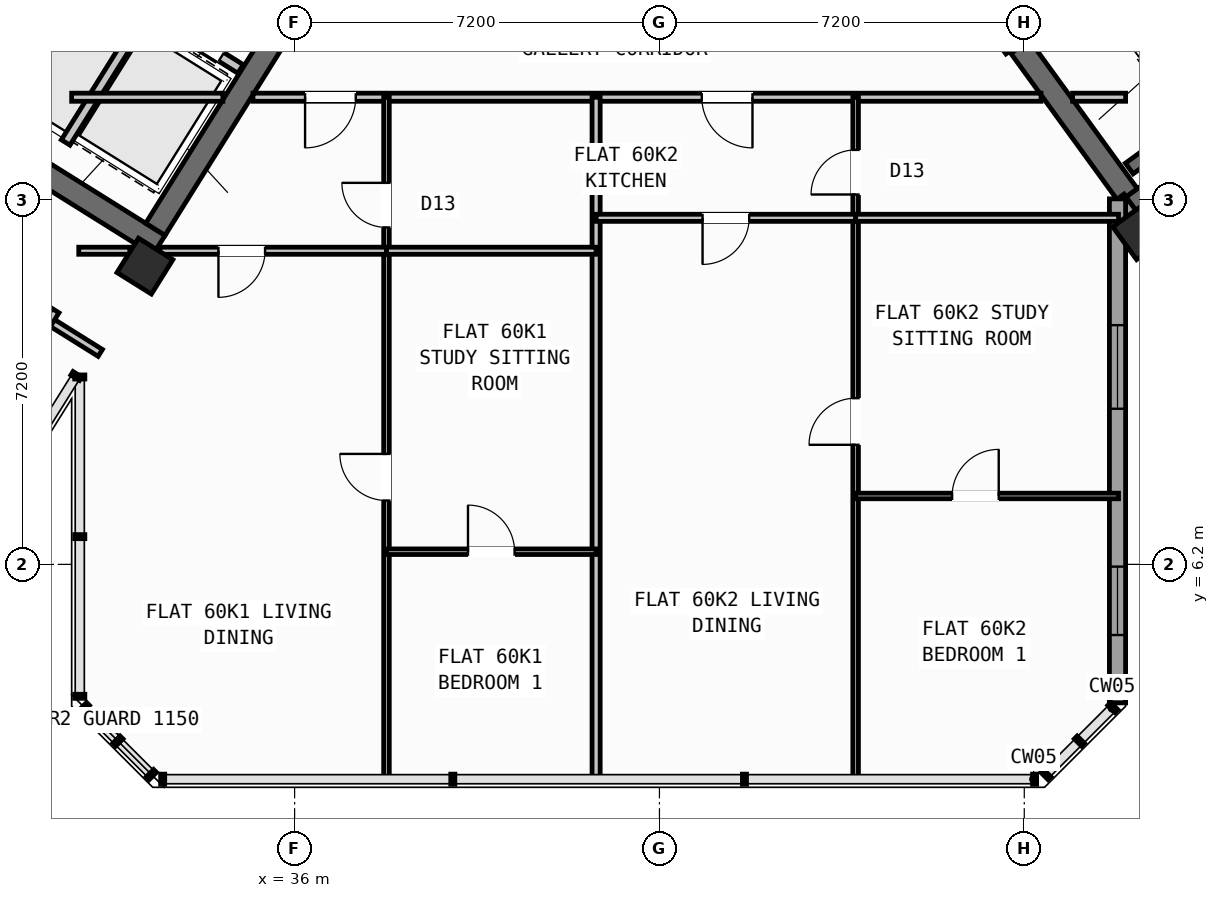
"""IFC4 building model, lengths in metres.
Left out: names, types, materials, properties, quantities, classifications, styles, units other than length and angle.
Written with IfcOpenShell. Run it as: python <this file> out.ifc"""

import sys

from ifc_helpers import new_model, si_unit, direction, frame, frame_2d, origin, origin_2d, place, context, subcontext, project, spatial, rectangle, hollow_rectangle, extrude, source, transform, mapped, element, fill, save


model = new_model("IFC4")
c1 = context("Model", 3, precision=1e-05, world=origin(), true_north=direction((0.0, 1.0)))
c2 = subcontext(c1, "Body", "Model", "MODEL_VIEW")
j1 = project(units=[si_unit("LENGTHUNIT", "METRE"), si_unit("PLANEANGLEUNIT", "RADIAN")], contexts=[c1])
p1 = place(None, origin())
s1 = spatial("IfcSite", under=j1, at=p1, CompositionType="ELEMENT")
p2 = place(p1, origin())
s2 = spatial("IfcBuilding", under=s1, at=p2, CompositionType="ELEMENT")
p3 = place(p2, frame((0.0, 0.0, 238.5)))
s3 = spatial("IfcBuildingStorey", under=s2, at=p3, CompositionType="ELEMENT", Elevation=238.5)
p4 = place(p3, frame((33.324, 12.503, 0.0), z_axis=(0.0, 0.0, 1.0), x_axis=(-0.848043529849, 0.529926571782, 0.0)))
e1 = element("IfcWall", 1, at=p4, inside=s3, PredefinedType="SHEAR", context=c2, shape_type="SweptSolid", body=[
    extrude(rectangle(XDim=13.04, YDim=0.45, at=frame_2d((6.52, 0.0))), origin(), (0.0, 0.0, 1.0), 3.35),
])
p5 = place(p3, frame((36.683, 18.304, 0.0), z_axis=(0.0, 0.0, 1.0), x_axis=(-0.529904039071, -0.848057609704, 0.0)))
e2 = element("IfcWall", 2, at=p5, inside=s3, PredefinedType="SHEAR", context=c2, shape_type="SweptSolid", body=[
    extrude(rectangle(XDim=6.475, YDim=0.45, at=frame_2d((3.238, 0.0))), origin(), (0.0, 0.0, 1.0), 3.35),
])
p6 = place(p3, frame((52.399, 13.169, 0.0), z_axis=(0.0, 0.0, 1.0), x_axis=(0.809022352778, 0.587777877013, 0.0)))
e3 = element("IfcWall", 3, at=p6, inside=s3, PredefinedType="SHEAR", context=c2, shape_type="SweptSolid", body=[
    extrude(rectangle(XDim=12.24, YDim=0.45, at=frame_2d((6.12, 0.0))), origin(), (0.0, 0.0, 1.0), 3.35),
])
p7 = place(p3, frame((52.449, 13.483, 0.0), z_axis=(0.0, 0.0, 1.0), x_axis=(-0.587819244441, 0.808992296542, 0.0)))
e4 = element("IfcWall", 4, at=p7, inside=s3, PredefinedType="SHEAR", context=c2, shape_type="SweptSolid", body=[
    extrude(rectangle(XDim=3.625, YDim=0.45, at=frame_2d((1.812, 0.0))), origin(), (0.0, 0.0, 1.0), 3.35),
])
m1 = source(origin(), c2, "Body", "SweptSolid", [
    extrude(hollow_rectangle(XDim=0.8, YDim=0.8, WallThickness=0.032, at=origin_2d()), origin(), (0.0, 0.0, 1.0), 3.6),
])
for number, where, z_axis, x_axis in (
    (5, (33.046, 12.087, 0.0), (0.0, 0.0, 1.0), (-0.848, 0.53, 0.0)),
    (6, (52.705, 12.773, 0.0), (0.0, 0.0, 1.0), (0.809, 0.588, 0.0)),
):
    element("IfcColumn", number, at=place(p3, frame(where, z_axis=z_axis, x_axis=x_axis)), inside=s3, PredefinedType="COLUMN", context=c2, shape_type="MappedRepresentation", body=[
        mapped(m1, transform((0.0, 0.0, 0.0), scale=1.0)),
    ])
p8 = place(p3, frame((56.581, 7.439, 0.0), z_axis=(0.0, 0.0, 1.0), x_axis=(-0.587776558368, 0.809023310809, 0.0)))
e7 = element("IfcWall", 7, at=p8, inside=s3, PredefinedType="STANDARD", context=c2, shape_type="SweptSolid", body=[
    extrude(rectangle(XDim=7.385, YDim=0.32, at=frame_2d((3.693, 0.0))), origin(), (0.0, 0.0, 1.0), 2.875),
])
p9 = place(p8, frame((1.731, 0.0, 0.9)))
e8 = element("IfcOpeningElement", 8, at=p9, cuts=e7, PredefinedType="OPENING", context=c2, shape_type="SweptSolid", body=[
    extrude(rectangle(XDim=1.65, YDim=1.45, at=frame_2d((0.825, 0.725))), frame((0.0, 0.17, 0.0), z_axis=(0.0, -1.0, 0.0), x_axis=(1.0, 0.0, 0.0)), (0.0, 0.0, 1.0), 0.34),
])
p10 = place(p3, frame((52.24, 13.414, 0.0), z_axis=(0.0, 0.0, 1.0), x_axis=(0.0, -1.0, 0.0)))
e9 = element("IfcWall", 9, at=p10, inside=s3, PredefinedType="STANDARD", context=c2, shape_type="SweptSolid", body=[
    extrude(rectangle(XDim=9.948, YDim=0.32, at=frame_2d((4.974, 0.0))), origin(), (0.0, 0.0, 1.0), 3.35),
])
p11 = place(p10, frame((2.492, 0.0, 0.9)))
e10 = element("IfcOpeningElement", 10, at=p11, cuts=e9, PredefinedType="OPENING", context=c2, shape_type="SweptSolid", body=[
    extrude(rectangle(XDim=1.65, YDim=1.45, at=frame_2d((0.825, 0.725))), frame((0.0, 0.17, 0.0), z_axis=(0.0, -1.0, 0.0), x_axis=(1.0, 0.0, 0.0)), (0.0, 0.0, 1.0), 0.34),
])
p12 = place(p10, frame((7.258, 0.0, 0.9)))
e11 = element("IfcOpeningElement", 11, at=p12, cuts=e9, PredefinedType="OPENING", context=c2, shape_type="SweptSolid", body=[
    extrude(rectangle(XDim=1.35, YDim=1.45, at=frame_2d((0.675, 0.725))), frame((0.0, 0.17, 0.0), z_axis=(0.0, -1.0, 0.0), x_axis=(1.0, 0.0, 0.0)), (0.0, 0.0, 1.0), 0.34),
])
p13 = place(p3, frame((31.288, 18.256, 0.0), z_axis=(0.0, 0.0, 1.0), x_axis=(-0.529943379326, -0.848033026897, 0.0)))
e12 = element("IfcWall", 12, at=p13, inside=s3, PredefinedType="SHEAR", context=c2, shape_type="SweptSolid", body=[
    extrude(rectangle(XDim=3.16, YDim=0.26, at=frame_2d((1.58, 0.0))), origin(), (0.0, 0.0, 1.0), 3.35),
])
p14 = place(p3, frame((34.933, 15.978, 0.0), z_axis=(0.0, 0.0, 1.0), x_axis=(-0.848055739377, 0.529907032327, 0.0)))
e13 = element("IfcWall", 13, at=p14, inside=s3, PredefinedType="STANDARD", context=c2, shape_type="SweptSolid", body=[
    extrude(rectangle(XDim=4.298, YDim=0.2, at=frame_2d((2.149, 0.0))), origin(), (0.0, 0.0, 1.0), 3.34),
])
p15 = place(p14, frame((0.448, 0.0, 0.0)))
e14 = element("IfcOpeningElement", 14, at=p15, cuts=e13, PredefinedType="OPENING", context=c2, shape_type="SweptSolid", body=[
    extrude(rectangle(XDim=1.3, YDim=2.2, at=frame_2d((0.65, 1.1))), frame((0.0, 0.11, 0.0), z_axis=(0.0, -1.0, 0.0), x_axis=(1.0, 0.0, 0.0)), (0.0, 0.0, 1.0), 0.22),
])
p16 = place(p14, frame((2.523, 0.0, 0.0)))
e15 = element("IfcOpeningElement", 15, at=p16, cuts=e13, PredefinedType="OPENING", context=c2, shape_type="SweptSolid", body=[
    extrude(rectangle(XDim=1.45, YDim=2.25, at=frame_2d((0.725, 1.125))), frame((0.0, 0.11, 0.0), z_axis=(0.0, -1.0, 0.0), x_axis=(1.0, 0.0, 0.0)), (0.0, 0.0, 1.0), 0.22),
])
p17 = place(p3, frame((33.029, 17.003, 0.0), z_axis=(0.0, 0.0, 1.0), x_axis=(-0.529916267533, -0.848049968695, 0.0)))
e16 = element("IfcWall", 16, at=p17, inside=s3, PredefinedType="STANDARD", context=c2, shape_type="SweptSolid", body=[
    extrude(rectangle(XDim=2.92, YDim=0.2, at=frame_2d((1.46, 0.0))), origin(), (0.0, 0.0, 1.0), 3.34),
])
p18 = place(p3, frame((52.472, 14.013, 0.0), z_axis=(0.0, 0.0, 1.0), x_axis=(0.809028366311, 0.587769599847, 0.0)))
e17 = element("IfcWall", 17, at=p18, inside=s3, PredefinedType="SHEAR", context=c2, shape_type="SweptSolid", body=[
    extrude(rectangle(XDim=7.33, YDim=0.26, at=frame_2d((3.665, 0.0))), origin(), (0.0, 0.0, 1.0), 3.35),
])
p19 = place(p3, frame((32.164, 10.374, 0.0), z_axis=(0.0, 0.0, 1.0), x_axis=(-0.848044107957, 0.529925646633, 0.0)))
e18 = element("IfcWall", 18, at=p19, inside=s3, PredefinedType="PARTITIONING", context=c2, shape_type="SweptSolid", body=[
    extrude(rectangle(XDim=15.57, YDim=0.16, at=frame_2d((7.785, 0.0))), origin(), (0.0, 0.0, 1.0), 3.34),
])
p20 = place(p19, frame((10.83, 0.0, 0.0)))
e19 = element("IfcOpeningElement", 19, at=p20, cuts=e18, PredefinedType="OPENING", context=c2, shape_type="SweptSolid", body=[
    extrude(rectangle(XDim=1.0, YDim=2.1, at=frame_2d((0.5, 1.05))), frame((0.0, 0.09, 0.0), z_axis=(0.0, -1.0, 0.0), x_axis=(1.0, 0.0, 0.0)), (0.0, 0.0, 1.0), 0.18),
])
p21 = place(p3, frame((31.282, 11.208, 0.0), z_axis=(0.0, 0.0, 1.0), x_axis=(-0.529938869374, -0.84803584519, 0.0)))
e20 = element("IfcWall", 20, at=p21, inside=s3, PredefinedType="PARTITIONING", context=c2, shape_type="SweptSolid", body=[
    extrude(rectangle(XDim=5.48, YDim=0.16, at=frame_2d((2.74, 0.0))), origin(), (0.0, 0.0, 1.0), 3.34),
])
p22 = place(p3, frame((31.6, 15.42, 0.0), z_axis=(0.0, 0.0, 1.0), x_axis=(1.0, 0.0, 0.0)))
e21 = element("IfcWall", 21, at=p22, inside=s3, PredefinedType="PARTITIONING", context=c2, shape_type="SweptSolid", body=[
    extrude(rectangle(XDim=2.984, YDim=0.16, at=frame_2d((1.492, 0.0))), origin(), (0.0, 0.0, 1.0), 3.34),
])
p23 = place(p3, frame((35.178, 15.42, 0.0), z_axis=(0.0, 0.0, 1.0), x_axis=(1.0, 0.0, 0.0)))
e22 = element("IfcWall", 22, at=p23, inside=s3, PredefinedType="PARTITIONING", context=c2, shape_type="SweptSolid", body=[
    extrude(rectangle(XDim=15.552, YDim=0.16, at=frame_2d((7.776, 0.0))), origin(), (0.0, 0.0, 1.0), 3.34),
])
p24 = place(p23, frame((1.028, 0.0, 0.0)))
e23 = element("IfcOpeningElement", 23, at=p24, cuts=e22, PredefinedType="OPENING", context=c2, shape_type="SweptSolid", body=[
    extrude(rectangle(XDim=1.0, YDim=2.1, at=frame_2d((0.5, 1.05))), frame((0.0, 0.09, 0.0), z_axis=(0.0, -1.0, 0.0), x_axis=(1.0, 0.0, 0.0)), (0.0, 0.0, 1.0), 0.18),
])
p25 = place(p23, frame((8.858, 0.0, 0.0)))
e24 = element("IfcOpeningElement", 24, at=p25, cuts=e22, PredefinedType="OPENING", context=c2, shape_type="SweptSolid", body=[
    extrude(rectangle(XDim=1.0, YDim=2.1, at=frame_2d((0.5, 1.05))), frame((0.0, 0.09, 0.0), z_axis=(0.0, -1.0, 0.0), x_axis=(1.0, 0.0, 0.0)), (0.0, 0.0, 1.0), 0.18),
])
p26 = place(p3, frame((51.354, 15.42, 0.0), z_axis=(0.0, 0.0, 1.0), x_axis=(1.0, 0.0, 0.0)))
e25 = element("IfcWall", 25, at=p26, inside=s3, PredefinedType="PARTITIONING", context=c2, shape_type="SweptSolid", body=[
    extrude(rectangle(XDim=1.046, YDim=0.16, at=frame_2d((0.523, 0.0))), origin(), (0.0, 0.0, 1.0), 3.34),
])
p27 = place(p3, frame((50.119, 16.333, 0.0), z_axis=(0.0, 0.0, 1.0), x_axis=(-0.587749856981, 0.809042709391, 0.0)))
e26 = element("IfcWall", 26, at=p27, inside=s3, PredefinedType="STANDARD", context=c2, shape_type="SweptSolid", body=[
    extrude(rectangle(XDim=2.96, YDim=0.2, at=frame_2d((1.48, 0.0))), origin(), (0.0, 0.0, 1.0), 3.34),
])
p28 = place(p27, frame((0.53, 0.0, 0.0)))
e27 = element("IfcOpeningElement", 27, at=p28, cuts=e26, PredefinedType="OPENING", context=c2, shape_type="SweptSolid", body=[
    extrude(rectangle(XDim=1.5, YDim=2.15, at=frame_2d((0.75, 1.075))), frame((0.0, 0.11, 0.0), z_axis=(0.0, -1.0, 0.0), x_axis=(1.0, 0.0, 0.0)), (0.0, 0.0, 1.0), 0.22),
])
p29 = place(p3, frame((41.95, 1.96, 0.0), z_axis=(0.0, 0.0, 1.0), x_axis=(0.0, 1.0, 0.0)))
e28 = element("IfcWall", 28, at=p29, inside=s3, PredefinedType="PARTITIONING", context=c2, shape_type="SweptSolid", body=[
    extrude(rectangle(XDim=13.46, YDim=0.16, at=frame_2d((6.73, 0.0))), origin(), (0.0, 0.0, 1.0), 3.34),
])
p30 = place(p3, frame((37.813, 1.96, 0.0), z_axis=(0.0, 0.0, 1.0), x_axis=(0.0, 1.0, 0.0)))
e29 = element("IfcWall", 29, at=p30, inside=s3, PredefinedType="PARTITIONING", context=c2, shape_type="SweptSolid", body=[
    extrude(rectangle(XDim=13.46, YDim=0.11, at=frame_2d((6.73, 0.0))), origin(), (0.0, 0.0, 1.0), 3.34),
])
p31 = place(p30, frame((5.5, 0.0, 0.0)))
e30 = element("IfcOpeningElement", 30, at=p31, cuts=e29, PredefinedType="OPENING", context=c2, shape_type="SweptSolid", body=[
    extrude(rectangle(XDim=0.92, YDim=2.08, at=frame_2d((0.46, 1.04))), frame((0.0, 0.065, 0.0), z_axis=(0.0, -1.0, 0.0), x_axis=(1.0, 0.0, 0.0)), (0.0, 0.0, 1.0), 0.13),
])
p32 = place(p30, frame((10.89, 0.0, 0.0)))
e31 = element("IfcOpeningElement", 31, at=p32, cuts=e29, PredefinedType="OPENING", context=c2, shape_type="SweptSolid", body=[
    extrude(rectangle(XDim=0.88, YDim=2.08, at=frame_2d((0.44, 1.04))), frame((0.0, 0.065, 0.0), z_axis=(0.0, -1.0, 0.0), x_axis=(1.0, 0.0, 0.0)), (0.0, 0.0, 1.0), 0.13),
])
p33 = place(p3, frame((31.74, 12.39, 0.0), z_axis=(0.0, 0.0, 1.0), x_axis=(1.0, 0.0, 0.0)))
e32 = element("IfcWall", 32, at=p33, inside=s3, PredefinedType="PLUMBINGWALL", context=c2, shape_type="SweptSolid", body=[
    extrude(rectangle(XDim=1.01, YDim=0.14, at=frame_2d((0.505, 0.0))), origin(), (0.0, 0.0, 1.0), 3.34),
])
p34 = place(p3, frame((33.339, 12.39, 0.0), z_axis=(0.0, 0.0, 1.0), x_axis=(1.0, 0.0, 0.0)))
e33 = element("IfcWall", 33, at=p34, inside=s3, PredefinedType="PLUMBINGWALL", context=c2, shape_type="SweptSolid", body=[
    extrude(rectangle(XDim=4.474, YDim=0.14, at=frame_2d((2.237, 0.0))), origin(), (0.0, 0.0, 1.0), 2.525),
])
p35 = place(p34, frame((1.158, 0.0, 0.0)))
e34 = element("IfcOpeningElement", 34, at=p35, cuts=e33, PredefinedType="OPENING", context=c2, shape_type="SweptSolid", body=[
    extrude(rectangle(XDim=0.92, YDim=2.08, at=frame_2d((0.46, 1.04))), frame((0.0, 0.08, 0.0), z_axis=(0.0, -1.0, 0.0), x_axis=(1.0, 0.0, 0.0)), (0.0, 0.0, 1.0), 0.16),
])
p36 = place(p3, frame((37.813, 12.39, 0.0), z_axis=(0.0, 0.0, 1.0), x_axis=(1.0, 0.0, 0.0)))
e35 = element("IfcWall", 35, at=p36, inside=s3, PredefinedType="PLUMBINGWALL", context=c2, shape_type="SweptSolid", body=[
    extrude(rectangle(XDim=4.137, YDim=0.14, at=frame_2d((2.068, 0.0))), origin(), (0.0, 0.0, 1.0), 2.525),
])
p37 = place(p3, frame((37.813, 6.45, 0.0), z_axis=(0.0, 0.0, 1.0), x_axis=(1.0, 0.0, 0.0)))
e36 = element("IfcWall", 36, at=p37, inside=s3, PredefinedType="PARTITIONING", context=c2, shape_type="SweptSolid", body=[
    extrude(rectangle(XDim=4.137, YDim=0.11, at=frame_2d((2.068, 0.0))), origin(), (0.0, 0.0, 1.0), 3.34),
])
p38 = place(p37, frame((1.608, 0.0, 0.0)))
e37 = element("IfcOpeningElement", 37, at=p38, cuts=e36, PredefinedType="OPENING", context=c2, shape_type="SweptSolid", body=[
    extrude(rectangle(XDim=0.92, YDim=2.08, at=frame_2d((0.46, 1.04))), frame((0.0, 0.065, 0.0), z_axis=(0.0, -1.0, 0.0), x_axis=(1.0, 0.0, 0.0)), (0.0, 0.0, 1.0), 0.13),
])
p39 = place(p3, frame((47.072, 1.96, 0.0), z_axis=(0.0, 0.0, 1.0), x_axis=(0.0, 1.0, 0.0)))
e38 = element("IfcWall", 38, at=p39, inside=s3, PredefinedType="PARTITIONING", context=c2, shape_type="SweptSolid", body=[
    extrude(rectangle(XDim=13.46, YDim=0.11, at=frame_2d((6.73, 0.0))), origin(), (0.0, 0.0, 1.0), 3.34),
])
p40 = place(p39, frame((6.6, 0.0, 0.0)))
e39 = element("IfcOpeningElement", 39, at=p40, cuts=e38, PredefinedType="OPENING", context=c2, shape_type="SweptSolid", body=[
    extrude(rectangle(XDim=0.92, YDim=2.08, at=frame_2d((0.46, 1.04))), frame((0.0, 0.065, 0.0), z_axis=(0.0, -1.0, 0.0), x_axis=(1.0, 0.0, 0.0)), (0.0, 0.0, 1.0), 0.13),
])
p41 = place(p39, frame((11.54, 0.0, 0.0)))
e40 = element("IfcOpeningElement", 40, at=p41, cuts=e38, PredefinedType="OPENING", context=c2, shape_type="SweptSolid", body=[
    extrude(rectangle(XDim=0.88, YDim=2.08, at=frame_2d((0.44, 1.04))), frame((0.0, 0.065, 0.0), z_axis=(0.0, -1.0, 0.0), x_axis=(1.0, 0.0, 0.0)), (0.0, 0.0, 1.0), 0.13),
])
p42 = place(p3, frame((41.95, 13.04, 0.0), z_axis=(0.0, 0.0, 1.0), x_axis=(1.0, 0.0, 0.0)))
e41 = element("IfcWall", 41, at=p42, inside=s3, PredefinedType="PLUMBINGWALL", context=c2, shape_type="SweptSolid", body=[
    extrude(rectangle(XDim=5.122, YDim=0.14, at=frame_2d((2.561, 0.0))), origin(), (0.0, 0.0, 1.0), 3.34),
])
p43 = place(p42, frame((2.101, 0.0, 0.0)))
e42 = element("IfcOpeningElement", 42, at=p43, cuts=e41, PredefinedType="OPENING", context=c2, shape_type="SweptSolid", body=[
    extrude(rectangle(XDim=0.92, YDim=2.08, at=frame_2d((0.46, 1.04))), frame((0.0, 0.08, 0.0), z_axis=(0.0, -1.0, 0.0), x_axis=(1.0, 0.0, 0.0)), (0.0, 0.0, 1.0), 0.16),
])
p44 = place(p3, frame((47.072, 13.04, 0.0), z_axis=(0.0, 0.0, 1.0), x_axis=(1.0, 0.0, 0.0)))
e43 = element("IfcWall", 43, at=p44, inside=s3, PredefinedType="PLUMBINGWALL", context=c2, shape_type="SweptSolid", body=[
    extrude(rectangle(XDim=5.188, YDim=0.14, at=frame_2d((2.594, 0.0))), origin(), (0.0, 0.0, 1.0), 2.525),
])
p45 = place(p3, frame((47.072, 7.55, 0.0), z_axis=(0.0, 0.0, 1.0), x_axis=(1.0, 0.0, 0.0)))
e44 = element("IfcWall", 44, at=p45, inside=s3, PredefinedType="PARTITIONING", context=c2, shape_type="SweptSolid", body=[
    extrude(rectangle(XDim=5.188, YDim=0.11, at=frame_2d((2.594, 0.0))), origin(), (0.0, 0.0, 1.0), 3.34),
])
p46 = place(p45, frame((1.904, 0.0, 0.0)))
e45 = element("IfcOpeningElement", 45, at=p46, cuts=e44, PredefinedType="OPENING", context=c2, shape_type="SweptSolid", body=[
    extrude(rectangle(XDim=0.92, YDim=2.08, at=frame_2d((0.46, 1.04))), frame((0.0, 0.065, 0.0), z_axis=(0.0, -1.0, 0.0), x_axis=(1.0, 0.0, 0.0)), (0.0, 0.0, 1.0), 0.13),
])
m2 = source(origin(), c2, "Body", "SweptSolid", [
    extrude(rectangle(XDim=1.65, YDim=1.45, at=frame_2d((0.825, 0.725))), frame((0.0, 0.03, 0.0), z_axis=(0.0, -1.0, 0.0), x_axis=(1.0, 0.0, 0.0)), (0.0, 0.0, 1.0), 0.06),
])
p47 = place(p11, origin())
e46 = element("IfcWindow", 46, at=p47, inside=s3, PartitioningType="SINGLE_PANEL", PredefinedType="WINDOW", context=c2, shape_type="MappedRepresentation", body=[
    mapped(m2, transform((0.0, 0.0, 0.0), scale=1.0)),
])
fill(e10, e46)
m3 = source(origin(), c2, "Body", "SweptSolid", [
    extrude(rectangle(XDim=1.35, YDim=1.45, at=frame_2d((0.675, 0.725))), frame((0.0, 0.03, 0.0), z_axis=(0.0, -1.0, 0.0), x_axis=(1.0, 0.0, 0.0)), (0.0, 0.0, 1.0), 0.06),
])
p48 = place(p12, origin())
e47 = element("IfcWindow", 47, at=p48, inside=s3, PartitioningType="SINGLE_PANEL", PredefinedType="WINDOW", context=c2, shape_type="MappedRepresentation", body=[
    mapped(m3, transform((0.0, 0.0, 0.0), scale=1.0)),
])
fill(e11, e47)
m4 = source(origin(), c2, "Body", "SweptSolid", [
    extrude(rectangle(XDim=1.3, YDim=2.2, at=frame_2d((0.65, 1.1))), frame((0.0, 0.025, 0.0), z_axis=(0.0, -1.0, 0.0), x_axis=(1.0, 0.0, 0.0)), (0.0, 0.0, 1.0), 0.05),
])
p49 = place(p15, origin())
e48 = element("IfcDoor", 48, at=p49, inside=s3, OperationType="DOUBLE_DOOR_SLIDING", PredefinedType="DOOR", context=c2, shape_type="MappedRepresentation", body=[
    mapped(m4, transform((0.0, 0.0, 0.0), scale=1.0)),
])
fill(e14, e48)
m5 = source(origin(), c2, "Body", "SweptSolid", [
    extrude(rectangle(XDim=0.92, YDim=2.08, at=frame_2d((0.46, 1.04))), frame((0.0, 0.025, 0.0), z_axis=(0.0, -1.0, 0.0), x_axis=(1.0, 0.0, 0.0)), (0.0, 0.0, 1.0), 0.05),
])
p50 = place(p31, origin())
e49 = element("IfcDoor", 49, at=p50, inside=s3, OperationType="SINGLE_SWING_RIGHT", PredefinedType="DOOR", context=c2, shape_type="MappedRepresentation", body=[
    mapped(m5, transform((0.0, 0.0, 0.0), scale=1.0)),
])
fill(e30, e49)
p51 = place(p38, origin())
e50 = element("IfcDoor", 50, at=p51, inside=s3, OperationType="SINGLE_SWING_LEFT", PredefinedType="DOOR", context=c2, shape_type="MappedRepresentation", body=[
    mapped(m5, transform((0.0, 0.0, 0.0), scale=1.0)),
])
fill(e37, e50)
m6 = source(origin(), c2, "Body", "SweptSolid", [
    extrude(rectangle(XDim=1.0, YDim=2.1, at=frame_2d((0.5, 1.05))), frame((0.0, 0.025, 0.0), z_axis=(0.0, -1.0, 0.0), x_axis=(1.0, 0.0, 0.0)), (0.0, 0.0, 1.0), 0.05),
])
p52 = place(p24, frame((1.0, 0.0, 0.0), z_axis=(0.0, 0.0, 1.0), x_axis=(-1.0, 0.0, 0.0)))
e51 = element("IfcDoor", 51, at=p52, inside=s3, OperationType="SINGLE_SWING_RIGHT", PredefinedType="DOOR", context=c2, shape_type="MappedRepresentation", body=[
    mapped(m6, transform((0.0, 0.0, 0.0), scale=1.0)),
])
fill(e23, e51)
p53 = place(p35, frame((0.92, 0.0, 0.0), z_axis=(0.0, 0.0, 1.0), x_axis=(-1.0, 0.0, 0.0)))
e52 = element("IfcDoor", 52, at=p53, inside=s3, OperationType="SINGLE_SWING_RIGHT", PredefinedType="DOOR", context=c2, shape_type="MappedRepresentation", body=[
    mapped(m5, transform((0.0, 0.0, 0.0), scale=1.0)),
])
fill(e34, e52)
m7 = source(origin(), c2, "Body", "SweptSolid", [
    extrude(rectangle(XDim=0.88, YDim=2.08, at=frame_2d((0.44, 1.04))), frame((0.0, 0.025, 0.0), z_axis=(0.0, -1.0, 0.0), x_axis=(1.0, 0.0, 0.0)), (0.0, 0.0, 1.0), 0.05),
])
p54 = place(p32, origin())
e53 = element("IfcDoor", 53, at=p54, inside=s3, OperationType="SINGLE_SWING_RIGHT", PredefinedType="DOOR", context=c2, shape_type="MappedRepresentation", body=[
    mapped(m7, transform((0.0, 0.0, 0.0), scale=1.0)),
])
fill(e31, e53)
p55 = place(p40, origin())
e54 = element("IfcDoor", 54, at=p55, inside=s3, OperationType="SINGLE_SWING_LEFT", PredefinedType="DOOR", context=c2, shape_type="MappedRepresentation", body=[
    mapped(m5, transform((0.0, 0.0, 0.0), scale=1.0)),
])
fill(e39, e54)
p56 = place(p46, origin())
e55 = element("IfcDoor", 55, at=p56, inside=s3, OperationType="SINGLE_SWING_RIGHT", PredefinedType="DOOR", context=c2, shape_type="MappedRepresentation", body=[
    mapped(m5, transform((0.0, 0.0, 0.0), scale=1.0)),
])
fill(e45, e55)
p57 = place(p25, frame((1.0, 0.0, 0.0), z_axis=(0.0, 0.0, 1.0), x_axis=(-1.0, 0.0, 0.0)))
e56 = element("IfcDoor", 56, at=p57, inside=s3, OperationType="SINGLE_SWING_LEFT", PredefinedType="DOOR", context=c2, shape_type="MappedRepresentation", body=[
    mapped(m6, transform((0.0, 0.0, 0.0), scale=1.0)),
])
fill(e24, e56)
p58 = place(p43, frame((0.92, 0.0, 0.0), z_axis=(0.0, 0.0, 1.0), x_axis=(-1.0, 0.0, 0.0)))
e57 = element("IfcDoor", 57, at=p58, inside=s3, OperationType="SINGLE_SWING_RIGHT", PredefinedType="DOOR", context=c2, shape_type="MappedRepresentation", body=[
    mapped(m5, transform((0.0, 0.0, 0.0), scale=1.0)),
])
fill(e42, e57)
p59 = place(p41, origin())
e58 = element("IfcDoor", 58, at=p59, inside=s3, OperationType="SINGLE_SWING_LEFT", PredefinedType="DOOR", context=c2, shape_type="MappedRepresentation", body=[
    mapped(m7, transform((0.0, 0.0, 0.0), scale=1.0)),
])
fill(e40, e58)
save(model, sys.argv[1])
